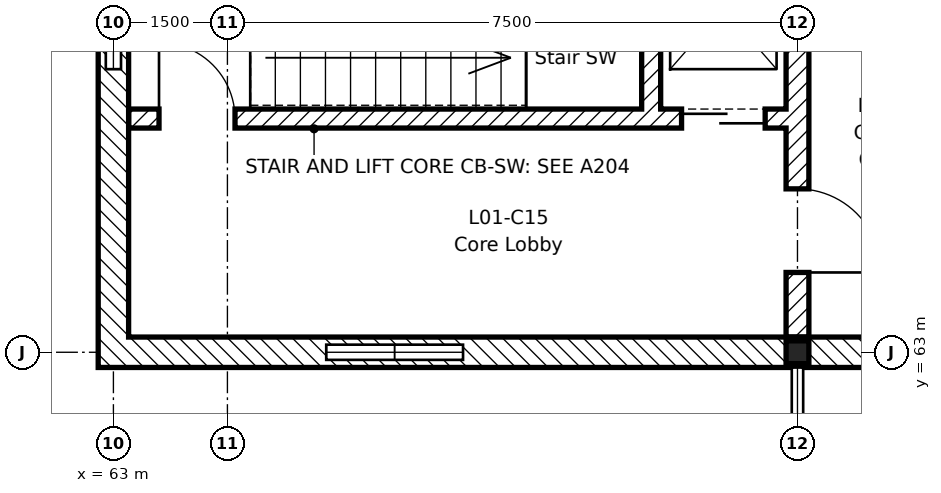
"""IFC4 building model, lengths in metres.
Left out: names, types, materials, properties, quantities, classifications, styles, units other than length and angle.
Written with IfcOpenShell. Run it as: python <this file> out.ifc"""

import sys

from ifc_helpers import new_model, si_unit, direction, frame, frame_2d, origin, origin_2d, place, context, subcontext, project, spatial, rectangle, i_section, extrude, element, fill, save


model = new_model("IFC4")
c1 = context("Model", 3, precision=1e-05, world=origin(), true_north=direction((0.0, 1.0)))
c2 = subcontext(c1, "Body", "Model", "MODEL_VIEW")
j1 = project(units=[si_unit("LENGTHUNIT", "METRE"), si_unit("PLANEANGLEUNIT", "RADIAN")], contexts=[c1])
p1 = place(None, origin())
s1 = spatial("IfcSite", under=j1, at=p1, CompositionType="ELEMENT")
p2 = place(p1, origin())
s2 = spatial("IfcBuilding", under=s1, at=p2, CompositionType="ELEMENT")
p3 = place(p2, frame((0.0, 0.0, 5.4)))
s3 = spatial("IfcBuildingStorey", under=s2, at=p3, CompositionType="ELEMENT", Elevation=5.4)
p4 = place(p3, frame((72.0, 63.0, -0.2), z_axis=(0.0, 0.0, 1.0), x_axis=(1.0, 0.0, 0.0)))
e1 = element("IfcColumn", 1, at=p4, inside=s3, PredefinedType="COLUMN", context=c2, shape_type="SweptSolid", body=[
    extrude(i_section(OverallWidth=0.3, OverallDepth=0.3, WebThickness=0.011, FlangeThickness=0.019, FilletRadius=0.027, at=origin_2d()), origin(), (0.0, 0.0, 1.0), 4.5),
])
p5 = place(p3, frame((72.0, 63.2, 0.0), z_axis=(0.0, 0.0, 1.0), x_axis=(0.0, 1.0, 0.0)))
e2 = element("IfcWall", 2, at=p5, inside=s3, PredefinedType="SHEAR", context=c2, shape_type="SweptSolid", body=[
    extrude(rectangle(XDim=8.95, YDim=0.3, at=frame_2d((4.475, 0.0))), origin(), (0.0, 0.0, 1.0), 4.3),
])
p6 = place(p5, frame((0.85, 0.0, 0.0)))
e3 = element("IfcOpeningElement", 3, at=p6, cuts=e2, PredefinedType="OPENING", context=c2, shape_type="SweptSolid", body=[
    extrude(rectangle(XDim=1.1, YDim=2.1, at=frame_2d((0.55, 1.05))), frame((0.0, 0.16, 0.0), z_axis=(0.0, -1.0, 0.0), x_axis=(1.0, 0.0, 0.0)), (0.0, 0.0, 1.0), 0.32),
])
p7 = place(p3, frame((63.2, 66.075, 0.0), z_axis=(0.0, 0.0, 1.0), x_axis=(1.0, 0.0, 0.0)))
e4 = element("IfcWall", 4, at=p7, inside=s3, PredefinedType="SHEAR", context=c2, shape_type="SweptSolid", body=[
    extrude(rectangle(XDim=8.65, YDim=0.25, at=frame_2d((4.325, 0.0))), origin(), (0.0, 0.0, 1.0), 4.3),
])
p8 = place(p7, frame((0.4, 0.0, 0.0)))
e5 = element("IfcOpeningElement", 5, at=p8, cuts=e4, PredefinedType="OPENING", context=c2, shape_type="SweptSolid", body=[
    extrude(rectangle(XDim=1.0, YDim=2.1, at=frame_2d((0.5, 1.05))), frame((0.0, 0.135, 0.0), z_axis=(0.0, -1.0, 0.0), x_axis=(1.0, 0.0, 0.0)), (0.0, 0.0, 1.0), 0.27),
])
p9 = place(p7, frame((7.275, 0.0, 0.0)))
e6 = element("IfcOpeningElement", 6, at=p9, cuts=e4, PredefinedType="OPENING", context=c2, shape_type="SweptSolid", body=[
    extrude(rectangle(XDim=1.1, YDim=2.1, at=frame_2d((0.55, 1.05))), frame((0.0, 0.135, 0.0), z_axis=(0.0, -1.0, 0.0), x_axis=(1.0, 0.0, 0.0)), (0.0, 0.0, 1.0), 0.27),
])
p10 = place(p3, frame((70.075, 66.2, 0.0), z_axis=(0.0, 0.0, 1.0), x_axis=(0.0, 1.0, 0.0)))
e7 = element("IfcWall", 7, at=p10, inside=s3, PredefinedType="SHEAR", context=c2, shape_type="SweptSolid", body=[
    extrude(rectangle(XDim=2.85, YDim=0.25, at=frame_2d((1.425, 0.0))), origin(), (0.0, 0.0, 1.0), 4.3),
])
p11 = place(p3, frame((62.8, 63.0, 0.0), z_axis=(0.0, 0.0, 1.0), x_axis=(1.0, 0.0, 0.0)))
e8 = element("IfcWall", 8, at=p11, inside=s3, PredefinedType="STANDARD", context=c2, shape_type="SweptSolid", body=[
    extrude(rectangle(XDim=3.0, YDim=0.4, at=frame_2d((1.5, 0.0))), origin(), (0.0, 0.0, 1.0), 4.3),
])
p12 = place(p3, frame((67.6, 63.0, 0.0), z_axis=(0.0, 0.0, 1.0), x_axis=(1.0, 0.0, 0.0)))
e9 = element("IfcWall", 9, at=p12, inside=s3, PredefinedType="STANDARD", context=c2, shape_type="SweptSolid", body=[
    extrude(rectangle(XDim=4.4, YDim=0.4, at=frame_2d((2.2, 0.0))), origin(), (0.0, 0.0, 1.0), 4.3),
])
p13 = place(p3, frame((65.8, 63.0, 0.0), z_axis=(0.0, 0.0, 1.0), x_axis=(1.0, 0.0, 0.0)))
e10 = element("IfcWall", 10, at=p13, inside=s3, PredefinedType="STANDARD", context=c2, shape_type="SweptSolid", body=[
    extrude(rectangle(XDim=1.8, YDim=0.4, at=frame_2d((0.9, 0.0))), origin(), (0.0, 0.0, 1.0), 0.9),
])
p14 = place(p3, frame((72.0, 63.0, 0.0), z_axis=(0.0, 0.0, 1.0), x_axis=(1.0, 0.0, 0.0)))
e11 = element("IfcWall", 11, at=p14, inside=s3, PredefinedType="STANDARD", context=c2, shape_type="SweptSolid", body=[
    extrude(rectangle(XDim=27.0, YDim=0.4, at=frame_2d((13.5, 0.0))), origin(), (0.0, 0.0, 1.0), 3.81),
])
p15 = place(p3, frame((63.0, 63.2, 0.0), z_axis=(0.0, 0.0, 1.0), x_axis=(0.0, 1.0, 0.0)))
e12 = element("IfcWall", 12, at=p15, inside=s3, PredefinedType="STANDARD", context=c2, shape_type="SweptSolid", body=[
    extrude(rectangle(XDim=3.525, YDim=0.4, at=frame_2d((1.763, 0.0))), origin(), (0.0, 0.0, 1.0), 4.3),
])
p16 = place(p3, frame((63.0, 66.725, 0.0), z_axis=(0.0, 0.0, 1.0), x_axis=(0.0, 1.0, 0.0)))
e13 = element("IfcWall", 13, at=p16, inside=s3, PredefinedType="STANDARD", context=c2, shape_type="SweptSolid", body=[
    extrude(rectangle(XDim=1.8, YDim=0.4, at=frame_2d((0.9, 0.0))), origin(), (0.0, 0.0, 1.0), 0.9),
])
p17 = place(p8, origin())
e14 = element("IfcDoor", 14, at=p17, inside=s3, OperationType="SINGLE_SWING_LEFT", PredefinedType="DOOR", context=c2, shape_type="SweptSolid", body=[
    extrude(rectangle(XDim=1.0, YDim=2.1, at=frame_2d((0.5, 1.05))), frame((0.0, 0.025, 0.0), z_axis=(0.0, -1.0, 0.0), x_axis=(1.0, 0.0, 0.0)), (0.0, 0.0, 1.0), 0.05),
])
fill(e5, e14)
p18 = place(p6, frame((1.1, 0.0, 0.0), z_axis=(0.0, 0.0, 1.0), x_axis=(-1.0, 0.0, 0.0)))
e15 = element("IfcDoor", 15, at=p18, inside=s3, OperationType="SINGLE_SWING_RIGHT", PredefinedType="DOOR", context=c2, shape_type="SweptSolid", body=[
    extrude(rectangle(XDim=1.1, YDim=2.1, at=frame_2d((0.55, 1.05))), frame((0.0, 0.025, 0.0), z_axis=(0.0, -1.0, 0.0), x_axis=(1.0, 0.0, 0.0)), (0.0, 0.0, 1.0), 0.05),
])
fill(e3, e15)
p19 = place(p9, frame((1.1, 0.0, 0.0), z_axis=(0.0, 0.0, 1.0), x_axis=(-1.0, 0.0, 0.0)))
e16 = element("IfcDoor", 16, at=p19, inside=s3, OperationType="SLIDING_TO_LEFT", PredefinedType="DOOR", context=c2, shape_type="SweptSolid", body=[
    extrude(rectangle(XDim=1.1, YDim=2.1, at=frame_2d((0.55, 1.05))), frame((0.0, 0.025, 0.0), z_axis=(0.0, -1.0, 0.0), x_axis=(1.0, 0.0, 0.0)), (0.0, 0.0, 1.0), 0.05),
])
fill(e6, e16)
save(model, sys.argv[1])
